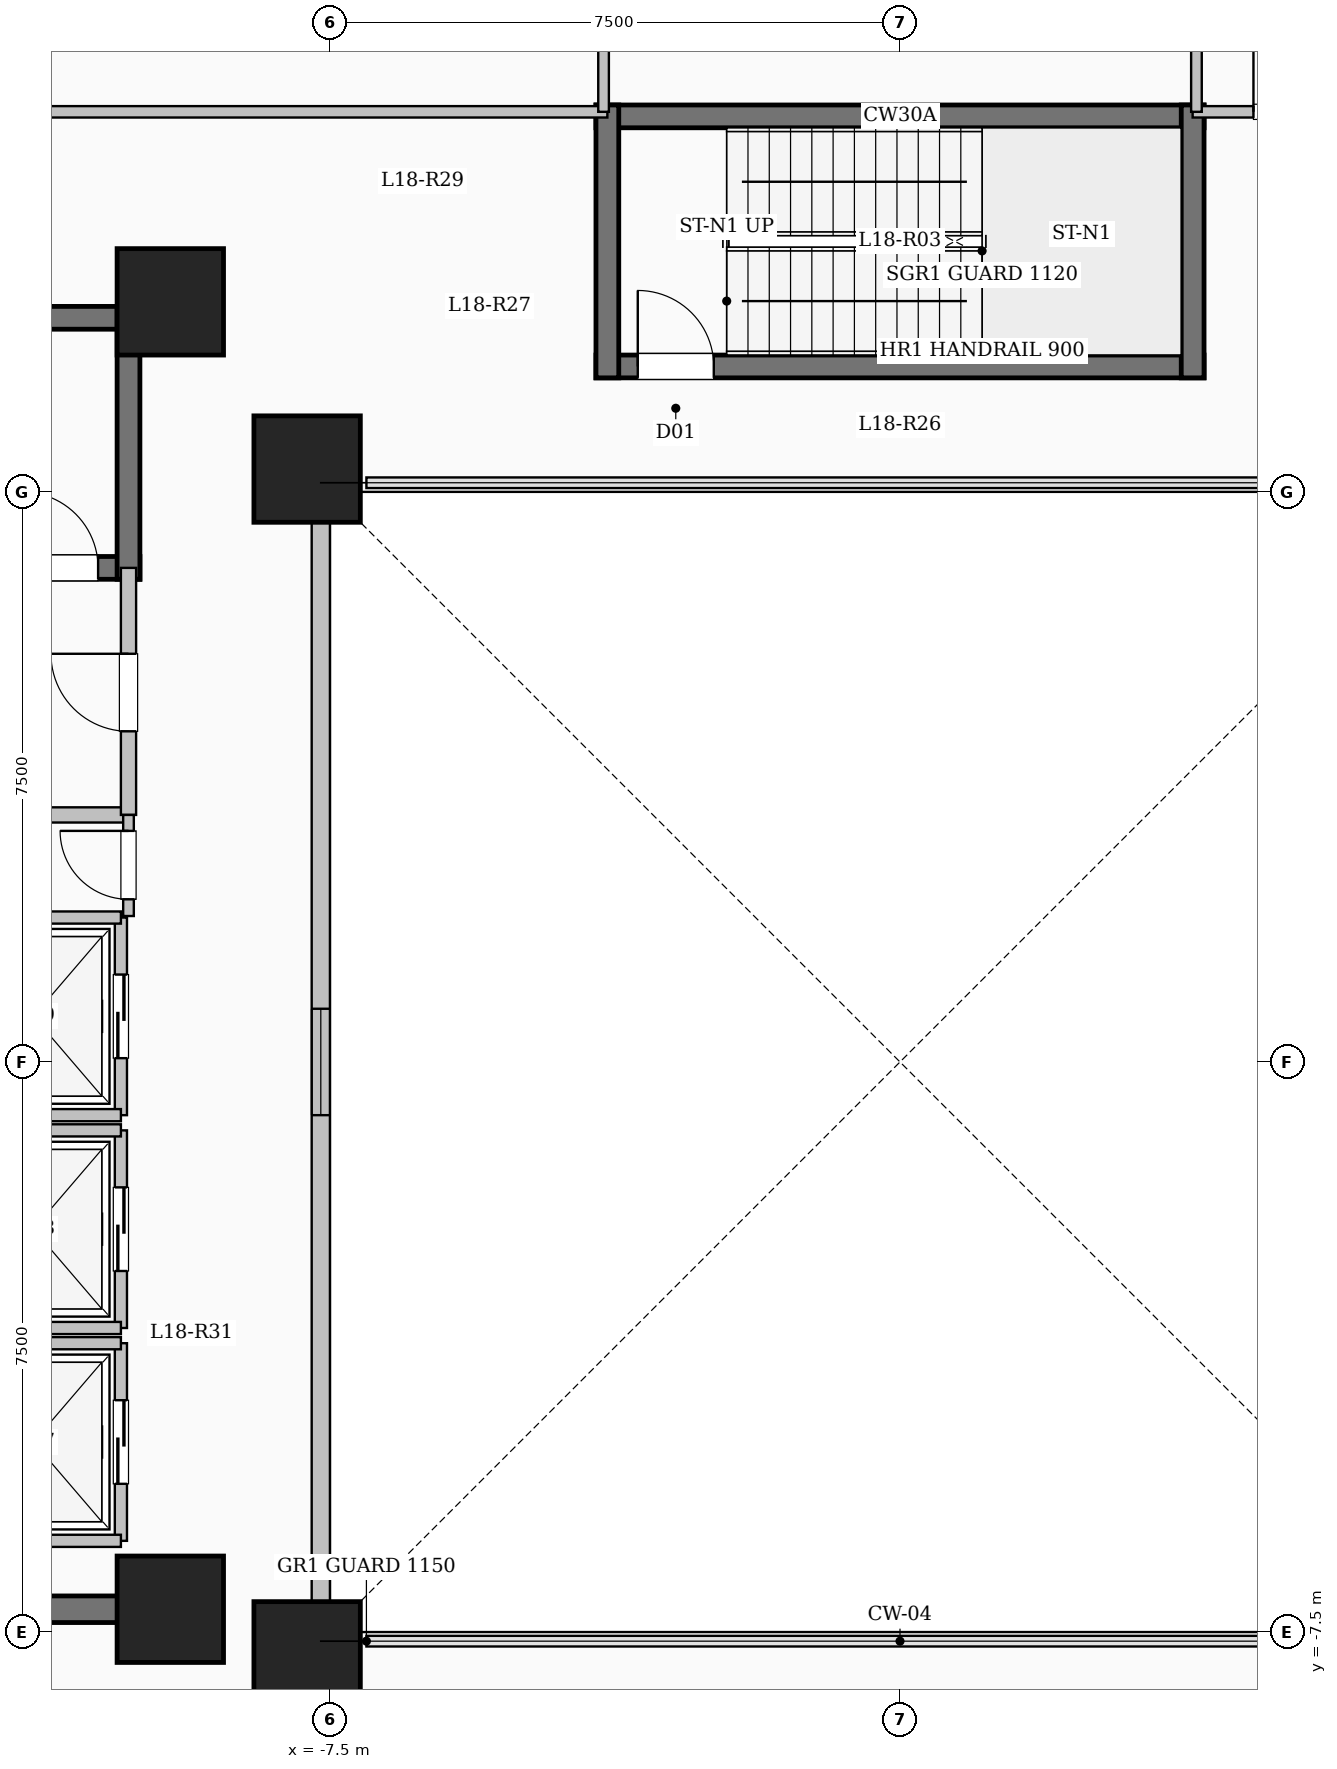
"""IFC4 building model, lengths in metres.
Left out: names, types, materials, properties, quantities, classifications, styles, units other than length and angle.
Written with IfcOpenShell. Run it as: python <this file> out.ifc"""

import sys

from ifc_helpers import new_model, si_unit, direction, frame, frame_2d, origin, origin_2d, place, context, subcontext, project, spatial, rectangle, extrude, element, fill, save


model = new_model("IFC4")
c1 = context("Model", 3, precision=1e-05, world=origin(), true_north=direction((0.0, 1.0)))
c2 = subcontext(c1, "Body", "Model", "MODEL_VIEW")
j1 = project(units=[si_unit("LENGTHUNIT", "METRE"), si_unit("PLANEANGLEUNIT", "RADIAN")], contexts=[c1])
p1 = place(None, origin())
s1 = spatial("IfcSite", under=j1, at=p1, CompositionType="ELEMENT")
p2 = place(p1, origin())
s2 = spatial("IfcBuilding", under=s1, at=p2, CompositionType="ELEMENT")
p3 = place(p2, frame((0.0, 0.0, 68.7)))
s3 = spatial("IfcBuildingStorey", under=s2, at=p3, CompositionType="ELEMENT", Elevation=68.7)
for number, where, z_axis, x_axis in (
    (1, (-7.8, -7.8, 0.0), (0.0, 0.0, 1.0), (1.0, 0.0, 0.0)),
    (2, (-7.8, 7.8, 0.0), (0.0, 0.0, 1.0), (1.0, 0.0, 0.0)),
    (3, (-9.6, -7.2, 0.0), (0.0, 0.0, 1.0), (1.0, 0.0, 0.0)),
    (4, (-9.6, 10.0, 0.0), (0.0, 0.0, 1.0), (1.0, 0.0, 0.0)),
):
    element("IfcColumn", number, at=place(p3, frame(where, z_axis=z_axis, x_axis=x_axis)), inside=s3, PredefinedType="COLUMN", context=c2, shape_type="SweptSolid", body=[
        extrude(rectangle(XDim=1.4, YDim=1.4, at=origin_2d()), origin(), (0.0, 0.0, 1.0), 4.5),
    ])
p4 = place(p3, frame((-7.62, 7.62, 0.0), z_axis=(0.0, 0.0, 1.0), x_axis=(0.0, -1.0, 0.0)))
e5 = element("IfcWall", 5, at=p4, inside=s3, PredefinedType="SOLIDWALL", context=c2, shape_type="SweptSolid", body=[
    extrude(rectangle(XDim=15.24, YDim=0.24, at=frame_2d((7.62, 0.0))), origin(), (0.0, 0.0, 1.0), 4.2),
])
p5 = place(p4, frame((6.92, 0.0, 0.95)))
e6 = element("IfcOpeningElement", 6, at=p5, cuts=e5, PredefinedType="OPENING", context=c2, shape_type="SweptSolid", body=[
    extrude(rectangle(XDim=1.4, YDim=1.5, at=frame_2d((0.7, 0.75))), frame((0.0, 0.13, 0.0), z_axis=(0.0, -1.0, 0.0), x_axis=(1.0, 0.0, 0.0)), (0.0, 0.0, 1.0), 0.26),
])
p6 = place(p3, frame((-18.0, 9.79, 0.0), z_axis=(0.0, 0.0, 1.0), x_axis=(1.0, 0.0, 0.0)))
e7 = element("IfcWall", 7, at=p6, inside=s3, PredefinedType="SHEAR", context=c2, shape_type="SweptSolid", body=[
    extrude(rectangle(XDim=8.0, YDim=0.3, at=frame_2d((4.0, 0.0))), origin(), (0.0, 0.0, 1.0), 4.5),
])
p7 = place(p3, frame((-18.0, 6.5, 0.0), z_axis=(0.0, 0.0, 1.0), x_axis=(1.0, 0.0, 0.0)))
e8 = element("IfcWall", 8, at=p7, inside=s3, PredefinedType="SHEAR", context=c2, shape_type="SweptSolid", body=[
    extrude(rectangle(XDim=8.0, YDim=0.3, at=frame_2d((4.0, 0.0))), origin(), (0.0, 0.0, 1.0), 4.5),
])
p8 = place(p7, frame((6.45, 0.0, 0.0)))
e9 = element("IfcOpeningElement", 9, at=p8, cuts=e8, PredefinedType="OPENING", context=c2, shape_type="SweptSolid", body=[
    extrude(rectangle(XDim=1.0, YDim=2.15, at=frame_2d((0.5, 1.075))), frame((0.0, 0.16, 0.0), z_axis=(0.0, -1.0, 0.0), x_axis=(1.0, 0.0, 0.0)), (0.0, 0.0, 1.0), 0.32),
])
p9 = place(p3, frame((-10.15, 6.35, 0.0), z_axis=(0.0, 0.0, 1.0), x_axis=(0.0, 1.0, 0.0)))
e10 = element("IfcWall", 10, at=p9, inside=s3, PredefinedType="SHEAR", context=c2, shape_type="SweptSolid", body=[
    extrude(rectangle(XDim=3.59, YDim=0.3, at=frame_2d((1.795, 0.0))), origin(), (0.0, 0.0, 1.0), 4.5),
])
p10 = place(p3, frame((-4.0, 12.44, 0.0), z_axis=(0.0, 0.0, 1.0), x_axis=(1.0, 0.0, 0.0)))
e11 = element("IfcWall", 11, at=p10, inside=s3, PredefinedType="SHEAR", context=c2, shape_type="SweptSolid", body=[
    extrude(rectangle(XDim=8.0, YDim=0.3, at=frame_2d((4.0, 0.0))), origin(), (0.0, 0.0, 1.0), 4.5),
])
p11 = place(p3, frame((-4.0, 9.15, 0.0), z_axis=(0.0, 0.0, 1.0), x_axis=(1.0, 0.0, 0.0)))
e12 = element("IfcWall", 12, at=p11, inside=s3, PredefinedType="SHEAR", context=c2, shape_type="SweptSolid", body=[
    extrude(rectangle(XDim=8.0, YDim=0.3, at=frame_2d((4.0, 0.0))), origin(), (0.0, 0.0, 1.0), 4.5),
])
p12 = place(p11, frame((0.55, 0.0, 0.0)))
e13 = element("IfcOpeningElement", 13, at=p12, cuts=e12, PredefinedType="OPENING", context=c2, shape_type="SweptSolid", body=[
    extrude(rectangle(XDim=1.0, YDim=2.15, at=frame_2d((0.5, 1.075))), frame((0.0, 0.16, 0.0), z_axis=(0.0, -1.0, 0.0), x_axis=(1.0, 0.0, 0.0)), (0.0, 0.0, 1.0), 0.32),
])
for number, where, z_axis, x_axis in (
    (14, (-3.85, 9.0, 0.0), (0.0, 0.0, 1.0), (0.0, 1.0, 0.0)),
    (15, (3.85, 9.0, 0.0), (0.0, 0.0, 1.0), (0.0, 1.0, 0.0)),
):
    element("IfcWall", number, at=place(p3, frame(where, z_axis=z_axis, x_axis=x_axis)), inside=s3, PredefinedType="SHEAR", context=c2, shape_type="SweptSolid", body=[
        extrude(rectangle(XDim=3.59, YDim=0.3, at=frame_2d((1.795, 0.0))), origin(), (0.0, 0.0, 1.0), 4.5),
    ])
p13 = place(p3, frame((-15.55, 3.25, 0.0), z_axis=(0.0, 0.0, 1.0), x_axis=(1.0, 0.0, 0.0)))
e16 = element("IfcWall", 16, at=p13, inside=s3, PredefinedType="SOLIDWALL", context=c2, shape_type="SweptSolid", body=[
    extrude(rectangle(XDim=5.4, YDim=0.2, at=frame_2d((2.7, 0.0))), origin(), (0.0, 0.0, 1.0), 4.2),
])
p14 = place(p3, frame((-10.15, 3.25, 0.0), z_axis=(0.0, 0.0, 1.0), x_axis=(0.0, 1.0, 0.0)))
e17 = element("IfcWall", 17, at=p14, inside=s3, PredefinedType="SOLIDWALL", context=c2, shape_type="SweptSolid", body=[
    extrude(rectangle(XDim=3.25, YDim=0.2, at=frame_2d((1.625, 0.0))), origin(), (0.0, 0.0, 1.0), 4.2),
])
p15 = place(p14, frame((1.1, 0.0, 0.0)))
e18 = element("IfcOpeningElement", 18, at=p15, cuts=e17, PredefinedType="OPENING", context=c2, shape_type="SweptSolid", body=[
    extrude(rectangle(XDim=1.02, YDim=2.15, at=frame_2d((0.51, 1.075))), frame((0.0, 0.11, 0.0), z_axis=(0.0, -1.0, 0.0), x_axis=(1.0, 0.0, 0.0)), (0.0, 0.0, 1.0), 0.22),
])
p16 = place(p3, frame((-10.25, -6.3, 0.0), z_axis=(0.0, 0.0, 1.0), x_axis=(0.0, 1.0, 0.0)))
e19 = element("IfcWall", 19, at=p16, inside=s3, PredefinedType="SOLIDWALL", context=c2, shape_type="SweptSolid", body=[
    extrude(rectangle(XDim=2.6, YDim=0.16, at=frame_2d((1.3, 0.0))), origin(), (0.0, 0.0, 1.0), 4.2),
])
p17 = place(p16, frame((0.75, 0.0, 0.0)))
e20 = element("IfcOpeningElement", 20, at=p17, cuts=e19, PredefinedType="OPENING", context=c2, shape_type="SweptSolid", body=[
    extrude(rectangle(XDim=1.1, YDim=2.15, at=frame_2d((0.55, 1.075))), frame((0.0, 0.09, 0.0), z_axis=(0.0, -1.0, 0.0), x_axis=(1.0, 0.0, 0.0)), (0.0, 0.0, 1.0), 0.18),
])
for number, where, z_axis, x_axis in (
    (21, (-12.55, -6.3, 0.0), (0.0, 0.0, 1.0), (1.0, 0.0, 0.0)),
    (22, (-12.55, -3.7, 0.0), (0.0, 0.0, 1.0), (1.0, 0.0, 0.0)),
):
    element("IfcWall", number, at=place(p3, frame(where, z_axis=z_axis, x_axis=x_axis)), inside=s3, PredefinedType="SOLIDWALL", context=c2, shape_type="SweptSolid", body=[
        extrude(rectangle(XDim=2.3, YDim=0.16, at=frame_2d((1.15, 0.0))), origin(), (0.0, 0.0, 1.0), 4.2),
    ])
p18 = place(p3, frame((-10.25, -3.5, 0.0), z_axis=(0.0, 0.0, 1.0), x_axis=(0.0, 1.0, 0.0)))
e23 = element("IfcWall", 23, at=p18, inside=s3, PredefinedType="SOLIDWALL", context=c2, shape_type="SweptSolid", body=[
    extrude(rectangle(XDim=2.6, YDim=0.16, at=frame_2d((1.3, 0.0))), origin(), (0.0, 0.0, 1.0), 4.2),
])
p19 = place(p18, frame((0.75, 0.0, 0.0)))
e24 = element("IfcOpeningElement", 24, at=p19, cuts=e23, PredefinedType="OPENING", context=c2, shape_type="SweptSolid", body=[
    extrude(rectangle(XDim=1.1, YDim=2.15, at=frame_2d((0.55, 1.075))), frame((0.0, 0.09, 0.0), z_axis=(0.0, -1.0, 0.0), x_axis=(1.0, 0.0, 0.0)), (0.0, 0.0, 1.0), 0.18),
])
for number, where, z_axis, x_axis in (
    (25, (-12.55, -3.5, 0.0), (0.0, 0.0, 1.0), (1.0, 0.0, 0.0)),
    (26, (-12.55, -0.9, 0.0), (0.0, 0.0, 1.0), (1.0, 0.0, 0.0)),
):
    element("IfcWall", number, at=place(p3, frame(where, z_axis=z_axis, x_axis=x_axis)), inside=s3, PredefinedType="SOLIDWALL", context=c2, shape_type="SweptSolid", body=[
        extrude(rectangle(XDim=2.3, YDim=0.16, at=frame_2d((1.15, 0.0))), origin(), (0.0, 0.0, 1.0), 4.2),
    ])
p20 = place(p3, frame((-10.25, -0.7, 0.0), z_axis=(0.0, 0.0, 1.0), x_axis=(0.0, 1.0, 0.0)))
e27 = element("IfcWall", 27, at=p20, inside=s3, PredefinedType="SOLIDWALL", context=c2, shape_type="SweptSolid", body=[
    extrude(rectangle(XDim=2.6, YDim=0.16, at=frame_2d((1.3, 0.0))), origin(), (0.0, 0.0, 1.0), 4.2),
])
p21 = place(p20, frame((0.75, 0.0, 0.0)))
e28 = element("IfcOpeningElement", 28, at=p21, cuts=e27, PredefinedType="OPENING", context=c2, shape_type="SweptSolid", body=[
    extrude(rectangle(XDim=1.1, YDim=2.15, at=frame_2d((0.55, 1.075))), frame((0.0, 0.09, 0.0), z_axis=(0.0, -1.0, 0.0), x_axis=(1.0, 0.0, 0.0)), (0.0, 0.0, 1.0), 0.18),
])
for number, where, z_axis, x_axis in (
    (29, (-12.55, -0.7, 0.0), (0.0, 0.0, 1.0), (1.0, 0.0, 0.0)),
    (30, (-12.55, 1.9, 0.0), (0.0, 0.0, 1.0), (1.0, 0.0, 0.0)),
):
    element("IfcWall", number, at=place(p3, frame(where, z_axis=z_axis, x_axis=x_axis)), inside=s3, PredefinedType="SOLIDWALL", context=c2, shape_type="SweptSolid", body=[
        extrude(rectangle(XDim=2.3, YDim=0.16, at=frame_2d((1.15, 0.0))), origin(), (0.0, 0.0, 1.0), 4.2),
    ])
p22 = place(p3, frame((-18.625, -7.2, 0.0), z_axis=(0.0, 0.0, 1.0), x_axis=(1.0, 0.0, 0.0)))
e31 = element("IfcWall", 31, at=p22, inside=s3, PredefinedType="SHEAR", context=c2, shape_type="SweptSolid", body=[
    extrude(rectangle(XDim=8.55, YDim=0.35, at=frame_2d((4.275, 0.0))), origin(), (0.0, 0.0, 1.0), 4.5),
])
p23 = place(p3, frame((-10.15, 1.92, 0.0), z_axis=(0.0, 0.0, 1.0), x_axis=(0.0, 1.0, 0.0)))
e32 = element("IfcWall", 32, at=p23, inside=s3, PredefinedType="PARTITIONING", context=c2, shape_type="SweptSolid", body=[
    extrude(rectangle(XDim=1.33, YDim=0.14, at=frame_2d((0.665, 0.0))), origin(), (0.0, 0.0, 1.0), 4.2),
])
p24 = place(p23, frame((0.22, 0.0, 0.0)))
e33 = element("IfcOpeningElement", 33, at=p24, cuts=e32, PredefinedType="OPENING", context=c2, shape_type="SweptSolid", body=[
    extrude(rectangle(XDim=0.9, YDim=2.08, at=frame_2d((0.45, 1.04))), frame((0.0, 0.08, 0.0), z_axis=(0.0, -1.0, 0.0), x_axis=(1.0, 0.0, 0.0)), (0.0, 0.0, 1.0), 0.16),
])
p25 = place(p3, frame((-22.55, 12.5, 0.0), z_axis=(0.0, 0.0, 1.0), x_axis=(1.0, 0.0, 0.0)))
e34 = element("IfcWall", 34, at=p25, inside=s3, PredefinedType="PARTITIONING", context=c2, shape_type="SweptSolid", body=[
    extrude(rectangle(XDim=18.7, YDim=0.15, at=frame_2d((9.35, 0.0))), origin(), (0.0, 0.0, 1.0), 4.2),
])
p26 = place(p25, frame((1.2, 0.0, 0.0)))
e35 = element("IfcOpeningElement", 35, at=p26, cuts=e34, PredefinedType="OPENING", context=c2, shape_type="SweptSolid", body=[
    extrude(rectangle(XDim=1.2, YDim=2.15, at=frame_2d((0.6, 1.075))), frame((0.0, 0.085, 0.0), z_axis=(0.0, -1.0, 0.0), x_axis=(1.0, 0.0, 0.0)), (0.0, 0.0, 1.0), 0.17),
])
p27 = place(p25, frame((8.633, 0.0, 0.0)))
e36 = element("IfcOpeningElement", 36, at=p27, cuts=e34, PredefinedType="OPENING", context=c2, shape_type="SweptSolid", body=[
    extrude(rectangle(XDim=1.08, YDim=2.15, at=frame_2d((0.54, 1.075))), frame((0.0, 0.085, 0.0), z_axis=(0.0, -1.0, 0.0), x_axis=(1.0, 0.0, 0.0)), (0.0, 0.0, 1.0), 0.17),
])
p28 = place(p3, frame((3.85, 12.5, 0.0), z_axis=(0.0, 0.0, 1.0), x_axis=(1.0, 0.0, 0.0)))
e37 = element("IfcWall", 37, at=p28, inside=s3, PredefinedType="PARTITIONING", context=c2, shape_type="SweptSolid", body=[
    extrude(rectangle(XDim=18.7, YDim=0.15, at=frame_2d((9.35, 0.0))), origin(), (0.0, 0.0, 1.0), 4.2),
])
p29 = place(p28, frame((0.8, 0.0, 0.0)))
e38 = element("IfcOpeningElement", 38, at=p29, cuts=e37, PredefinedType="OPENING", context=c2, shape_type="SweptSolid", body=[
    extrude(rectangle(XDim=0.95, YDim=2.15, at=frame_2d((0.475, 1.075))), frame((0.0, 0.085, 0.0), z_axis=(0.0, -1.0, 0.0), x_axis=(1.0, 0.0, 0.0)), (0.0, 0.0, 1.0), 0.17),
])
p30 = place(p28, frame((3.6, 0.0, 0.0)))
e39 = element("IfcOpeningElement", 39, at=p30, cuts=e37, PredefinedType="OPENING", context=c2, shape_type="SweptSolid", body=[
    extrude(rectangle(XDim=0.95, YDim=2.15, at=frame_2d((0.475, 1.075))), frame((0.0, 0.085, 0.0), z_axis=(0.0, -1.0, 0.0), x_axis=(1.0, 0.0, 0.0)), (0.0, 0.0, 1.0), 0.17),
])
p31 = place(p28, frame((6.55, 0.0, 0.0)))
e40 = element("IfcOpeningElement", 40, at=p31, cuts=e37, PredefinedType="OPENING", context=c2, shape_type="SweptSolid", body=[
    extrude(rectangle(XDim=1.08, YDim=2.15, at=frame_2d((0.54, 1.075))), frame((0.0, 0.085, 0.0), z_axis=(0.0, -1.0, 0.0), x_axis=(1.0, 0.0, 0.0)), (0.0, 0.0, 1.0), 0.17),
])
p32 = place(p28, frame((11.97, 0.0, 0.0)))
e41 = element("IfcOpeningElement", 41, at=p32, cuts=e37, PredefinedType="OPENING", context=c2, shape_type="SweptSolid", body=[
    extrude(rectangle(XDim=1.2, YDim=2.15, at=frame_2d((0.6, 1.075))), frame((0.0, 0.085, 0.0), z_axis=(0.0, -1.0, 0.0), x_axis=(1.0, 0.0, 0.0)), (0.0, 0.0, 1.0), 0.17),
])
for number, where, z_axis, x_axis in (
    (42, (-3.9, 12.5, 0.0), (0.0, 0.0, 1.0), (0.0, 1.0, 0.0)),
    (43, (3.9, 12.5, 0.0), (0.0, 0.0, 1.0), (0.0, 1.0, 0.0)),
):
    element("IfcWall", number, at=place(p3, frame(where, z_axis=z_axis, x_axis=x_axis)), inside=s3, PredefinedType="PARTITIONING", context=c2, shape_type="SweptSolid", body=[
        extrude(rectangle(XDim=12.58, YDim=0.14, at=frame_2d((6.29, 0.0))), origin(), (0.0, 0.0, 1.0), 4.2),
    ])
p33 = place(p5, origin())
e44 = element("IfcWindow", 44, at=p33, inside=s3, PartitioningType="SINGLE_PANEL", PredefinedType="WINDOW", context=c2, shape_type="SweptSolid", body=[
    extrude(rectangle(XDim=1.4, YDim=1.5, at=frame_2d((0.7, 0.75))), frame((0.0, 0.03, 0.0), z_axis=(0.0, -1.0, 0.0), x_axis=(1.0, 0.0, 0.0)), (0.0, 0.0, 1.0), 0.06),
])
fill(e6, e44)
p34 = place(p8, origin())
e45 = element("IfcDoor", 45, at=p34, inside=s3, OperationType="SINGLE_SWING_LEFT", PredefinedType="DOOR", context=c2, shape_type="SweptSolid", body=[
    extrude(rectangle(XDim=1.0, YDim=2.15, at=frame_2d((0.5, 1.075))), frame((0.0, 0.025, 0.0), z_axis=(0.0, -1.0, 0.0), x_axis=(1.0, 0.0, 0.0)), (0.0, 0.0, 1.0), 0.05),
])
fill(e9, e45)
p35 = place(p12, origin())
e46 = element("IfcDoor", 46, at=p35, inside=s3, OperationType="SINGLE_SWING_LEFT", PredefinedType="DOOR", context=c2, shape_type="SweptSolid", body=[
    extrude(rectangle(XDim=1.0, YDim=2.15, at=frame_2d((0.5, 1.075))), frame((0.0, 0.025, 0.0), z_axis=(0.0, -1.0, 0.0), x_axis=(1.0, 0.0, 0.0)), (0.0, 0.0, 1.0), 0.05),
])
fill(e13, e46)
p36 = place(p15, origin())
e47 = element("IfcDoor", 47, at=p36, inside=s3, OperationType="SINGLE_SWING_RIGHT", PredefinedType="DOOR", context=c2, shape_type="SweptSolid", body=[
    extrude(rectangle(XDim=1.02, YDim=2.15, at=frame_2d((0.51, 1.075))), frame((0.0, 0.025, 0.0), z_axis=(0.0, -1.0, 0.0), x_axis=(1.0, 0.0, 0.0)), (0.0, 0.0, 1.0), 0.05),
])
fill(e18, e47)
p37 = place(p17, origin())
e48 = element("IfcDoor", 48, at=p37, inside=s3, OperationType="SLIDING_TO_LEFT", PredefinedType="DOOR", context=c2, shape_type="SweptSolid", body=[
    extrude(rectangle(XDim=1.1, YDim=2.15, at=frame_2d((0.55, 1.075))), frame((0.0, 0.025, 0.0), z_axis=(0.0, -1.0, 0.0), x_axis=(1.0, 0.0, 0.0)), (0.0, 0.0, 1.0), 0.05),
])
fill(e20, e48)
p38 = place(p19, origin())
e49 = element("IfcDoor", 49, at=p38, inside=s3, OperationType="SLIDING_TO_LEFT", PredefinedType="DOOR", context=c2, shape_type="SweptSolid", body=[
    extrude(rectangle(XDim=1.1, YDim=2.15, at=frame_2d((0.55, 1.075))), frame((0.0, 0.025, 0.0), z_axis=(0.0, -1.0, 0.0), x_axis=(1.0, 0.0, 0.0)), (0.0, 0.0, 1.0), 0.05),
])
fill(e24, e49)
p39 = place(p21, origin())
e50 = element("IfcDoor", 50, at=p39, inside=s3, OperationType="SLIDING_TO_LEFT", PredefinedType="DOOR", context=c2, shape_type="SweptSolid", body=[
    extrude(rectangle(XDim=1.1, YDim=2.15, at=frame_2d((0.55, 1.075))), frame((0.0, 0.025, 0.0), z_axis=(0.0, -1.0, 0.0), x_axis=(1.0, 0.0, 0.0)), (0.0, 0.0, 1.0), 0.05),
])
fill(e28, e50)
p40 = place(p24, origin())
e51 = element("IfcDoor", 51, at=p40, inside=s3, OperationType="SINGLE_SWING_RIGHT", PredefinedType="DOOR", context=c2, shape_type="SweptSolid", body=[
    extrude(rectangle(XDim=0.9, YDim=2.08, at=frame_2d((0.45, 1.04))), frame((0.0, 0.025, 0.0), z_axis=(0.0, -1.0, 0.0), x_axis=(1.0, 0.0, 0.0)), (0.0, 0.0, 1.0), 0.05),
])
fill(e33, e51)
p41 = place(p29, origin())
e52 = element("IfcDoor", 52, at=p41, inside=s3, OperationType="SINGLE_SWING_LEFT", PredefinedType="DOOR", context=c2, shape_type="SweptSolid", body=[
    extrude(rectangle(XDim=0.95, YDim=2.15, at=frame_2d((0.475, 1.075))), frame((0.0, 0.025, 0.0), z_axis=(0.0, -1.0, 0.0), x_axis=(1.0, 0.0, 0.0)), (0.0, 0.0, 1.0), 0.05),
])
fill(e38, e52)
save(model, sys.argv[1])
